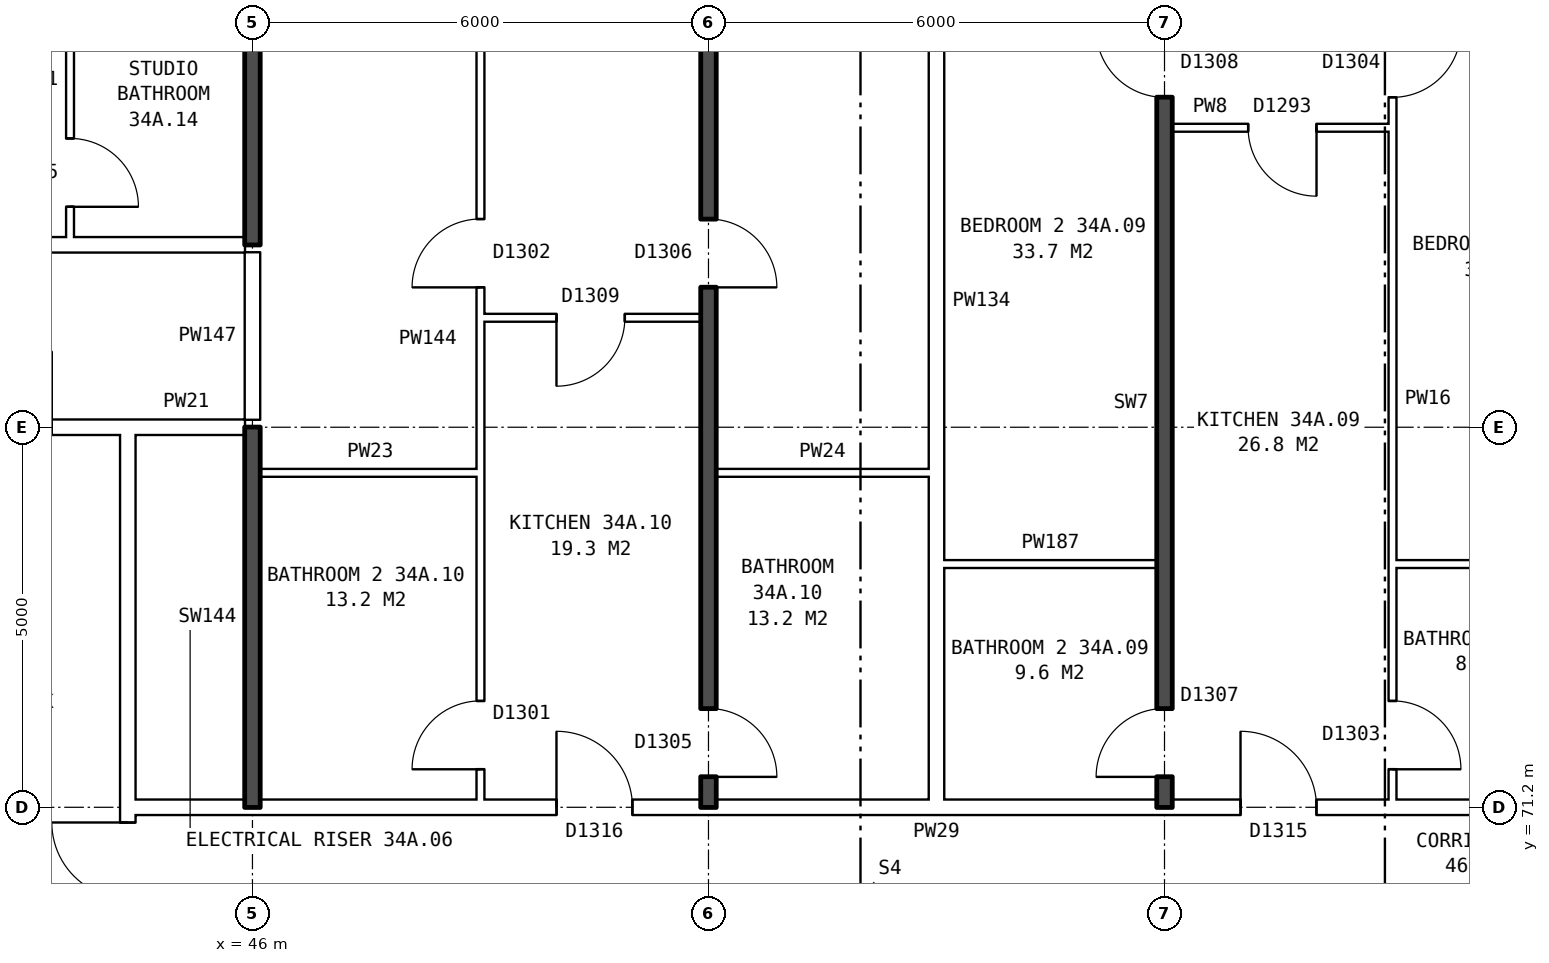
"""IFC4 building model, lengths in metres.
Left out: names, types, materials, properties, quantities, classifications, styles, units other than length and angle.
Written with IfcOpenShell. Run it as: python <this file> out.ifc"""

import sys

from ifc_helpers import new_model, si_unit, direction, frame, frame_2d, origin, place, context, subcontext, project, spatial, rectangle, extrude, element, fill, save


model = new_model("IFC4")
c1 = context("Model", 3, precision=1e-05, world=origin(), true_north=direction((0.0, 1.0)))
c2 = subcontext(c1, "Body", "Model", "MODEL_VIEW")
j1 = project(units=[si_unit("LENGTHUNIT", "METRE"), si_unit("PLANEANGLEUNIT", "RADIAN")], contexts=[c1])
p1 = place(None, origin())
s1 = spatial("IfcSite", under=j1, at=p1, CompositionType="ELEMENT")
p2 = place(p1, origin())
s2 = spatial("IfcBuilding", under=s1, at=p2, CompositionType="ELEMENT")
p3 = place(p2, frame((0.0, 0.0, 123.7)))
s3 = spatial("IfcBuildingStorey", under=s2, at=p3, CompositionType="ELEMENT", Elevation=123.7)
p4 = place(p3, frame((44.36, 63.9, 0.0), z_axis=(0.0, 0.0, 1.0), x_axis=(0.0, 1.0, 0.0)))
e1 = element("IfcWall", 1, at=p4, inside=s3, PredefinedType="PARTITIONING", context=c2, shape_type="SweptSolid", body=[
    extrude(rectangle(XDim=12.2, YDim=0.2, at=frame_2d((6.1, 0.0))), origin(), (0.0, 0.0, 1.0), 2.85),
])
p5 = place(p4, frame((5.1, 0.0, 0.0)))
e2 = element("IfcOpeningElement", 2, at=p5, cuts=e1, PredefinedType="OPENING", context=c2, shape_type="SweptSolid", body=[
    extrude(rectangle(XDim=2.0, YDim=2.1, at=frame_2d((1.0, 1.05))), frame((0.0, 0.11, 0.0), z_axis=(0.0, -1.0, 0.0), x_axis=(1.0, 0.0, 0.0)), (0.0, 0.0, 1.0), 0.22),
])
p6 = place(p3, frame((44.36, 71.2, 0.0), z_axis=(0.0, 0.0, 1.0), x_axis=(1.0, 0.0, 0.0)))
e3 = element("IfcWall", 3, at=p6, inside=s3, PredefinedType="PARTITIONING", context=c2, shape_type="SweptSolid", body=[
    extrude(rectangle(XDim=19.28, YDim=0.2, at=frame_2d((9.64, 0.0))), origin(), (0.0, 0.0, 1.0), 2.85),
])
p7 = place(p6, frame((14.64, 0.0, 0.0)))
e4 = element("IfcOpeningElement", 4, at=p7, cuts=e3, PredefinedType="OPENING", context=c2, shape_type="SweptSolid", body=[
    extrude(rectangle(XDim=1.0, YDim=2.1, at=frame_2d((0.5, 1.05))), frame((0.0, 0.11, 0.0), z_axis=(0.0, -1.0, 0.0), x_axis=(1.0, 0.0, 0.0)), (0.0, 0.0, 1.0), 0.22),
])
p8 = place(p6, frame((5.64, 0.0, 0.0)))
e5 = element("IfcOpeningElement", 5, at=p8, cuts=e3, PredefinedType="OPENING", context=c2, shape_type="SweptSolid", body=[
    extrude(rectangle(XDim=1.0, YDim=2.1, at=frame_2d((0.5, 1.05))), frame((0.0, 0.11, 0.0), z_axis=(0.0, -1.0, 0.0), x_axis=(1.0, 0.0, 0.0)), (0.0, 0.0, 1.0), 0.22),
])
p9 = place(p3, frame((55.1, 74.4, 0.0), z_axis=(0.0, 0.0, 1.0), x_axis=(1.0, 0.0, 0.0)))
e6 = element("IfcWall", 6, at=p9, inside=s3, PredefinedType="PARTITIONING", context=c2, shape_type="SweptSolid", body=[
    extrude(rectangle(XDim=2.8, YDim=0.1, at=frame_2d((1.4, 0.0))), origin(), (0.0, 0.0, 1.0), 2.85),
])
p10 = place(p3, frame((61.0, 74.4, 0.0), z_axis=(0.0, 0.0, 1.0), x_axis=(1.0, 0.0, 0.0)))
e7 = element("IfcWall", 7, at=p10, inside=s3, PredefinedType="PARTITIONING", context=c2, shape_type="SweptSolid", body=[
    extrude(rectangle(XDim=2.64, YDim=0.1, at=frame_2d((1.32, 0.0))), origin(), (0.0, 0.0, 1.0), 2.85),
])
p11 = place(p3, frame((46.1, 75.6, 0.0), z_axis=(0.0, 0.0, 1.0), x_axis=(1.0, 0.0, 0.0)))
e8 = element("IfcWall", 8, at=p11, inside=s3, PredefinedType="PARTITIONING", context=c2, shape_type="SweptSolid", body=[
    extrude(rectangle(XDim=2.9, YDim=0.1, at=frame_2d((1.45, 0.0))), origin(), (0.0, 0.0, 1.0), 2.85),
])
p12 = place(p3, frame((52.1, 75.6, 0.0), z_axis=(0.0, 0.0, 1.0), x_axis=(1.0, 0.0, 0.0)))
e9 = element("IfcWall", 9, at=p12, inside=s3, PredefinedType="PARTITIONING", context=c2, shape_type="SweptSolid", body=[
    extrude(rectangle(XDim=2.8, YDim=0.1, at=frame_2d((1.4, 0.0))), origin(), (0.0, 0.0, 1.0), 2.85),
])
p13 = place(p3, frame((41.36, 76.2, 0.0), z_axis=(0.0, 0.0, 1.0), x_axis=(1.0, 0.0, 0.0)))
e10 = element("IfcWall", 10, at=p13, inside=s3, PredefinedType="PARTITIONING", context=c2, shape_type="SweptSolid", body=[
    extrude(rectangle(XDim=3.0, YDim=0.2, at=frame_2d((1.5, 0.0))), origin(), (0.0, 0.0, 1.0), 2.85),
])
p14 = place(p13, frame((1.0, 0.0, 0.0)))
e11 = element("IfcOpeningElement", 11, at=p14, cuts=e10, PredefinedType="OPENING", context=c2, shape_type="SweptSolid", body=[
    extrude(rectangle(XDim=1.0, YDim=2.1, at=frame_2d((0.5, 1.05))), frame((0.0, 0.11, 0.0), z_axis=(0.0, -1.0, 0.0), x_axis=(1.0, 0.0, 0.0)), (0.0, 0.0, 1.0), 0.22),
])
p15 = place(p3, frame((44.36, 76.2, 0.0), z_axis=(0.0, 0.0, 1.0), x_axis=(1.0, 0.0, 0.0)))
e12 = element("IfcWall", 12, at=p15, inside=s3, PredefinedType="PARTITIONING", context=c2, shape_type="SweptSolid", body=[
    extrude(rectangle(XDim=1.54, YDim=0.2, at=frame_2d((0.77, 0.0))), origin(), (0.0, 0.0, 1.0), 2.85),
])
p16 = place(p3, frame((49.0, 77.64, 0.0), z_axis=(0.0, 0.0, 1.0), x_axis=(1.0, 0.0, 0.0)))
e13 = element("IfcWall", 13, at=p16, inside=s3, PredefinedType="PARTITIONING", context=c2, shape_type="SweptSolid", body=[
    extrude(rectangle(XDim=2.9, YDim=0.1, at=frame_2d((1.45, 0.0))), origin(), (0.0, 0.0, 1.0), 2.85),
])
p17 = place(p16, frame((1.0, 0.0, 0.0)))
e14 = element("IfcOpeningElement", 14, at=p17, cuts=e13, PredefinedType="OPENING", context=c2, shape_type="SweptSolid", body=[
    extrude(rectangle(XDim=0.9, YDim=2.1, at=frame_2d((0.45, 1.05))), frame((0.0, 0.06, 0.0), z_axis=(0.0, -1.0, 0.0), x_axis=(1.0, 0.0, 0.0)), (0.0, 0.0, 1.0), 0.12),
])
p18 = place(p3, frame((27.11, 78.6, 0.0), z_axis=(0.0, 0.0, 1.0), x_axis=(1.0, 0.0, 0.0)))
e15 = element("IfcWall", 15, at=p18, inside=s3, PredefinedType="PARTITIONING", context=c2, shape_type="SweptSolid", body=[
    extrude(rectangle(XDim=18.79, YDim=0.2, at=frame_2d((9.395, 0.0))), origin(), (0.0, 0.0, 1.0), 2.85),
])
p19 = place(p18, frame((14.19, 0.0, 0.0)))
e16 = element("IfcOpeningElement", 16, at=p19, cuts=e15, PredefinedType="OPENING", context=c2, shape_type="SweptSolid", body=[
    extrude(rectangle(XDim=1.0, YDim=2.1, at=frame_2d((0.5, 1.05))), frame((0.0, 0.11, 0.0), z_axis=(0.0, -1.0, 0.0), x_axis=(1.0, 0.0, 0.0)), (0.0, 0.0, 1.0), 0.22),
])
p20 = place(p18, frame((10.39, 0.0, 0.0)))
e17 = element("IfcOpeningElement", 17, at=p20, cuts=e15, PredefinedType="OPENING", context=c2, shape_type="SweptSolid", body=[
    extrude(rectangle(XDim=1.0, YDim=2.1, at=frame_2d((0.5, 1.05))), frame((0.0, 0.11, 0.0), z_axis=(0.0, -1.0, 0.0), x_axis=(1.0, 0.0, 0.0)), (0.0, 0.0, 1.0), 0.22),
])
p21 = place(p18, frame((4.59, 0.0, 0.0)))
e18 = element("IfcOpeningElement", 18, at=p21, cuts=e15, PredefinedType="OPENING", context=c2, shape_type="SweptSolid", body=[
    extrude(rectangle(XDim=1.0, YDim=2.1, at=frame_2d((0.5, 1.05))), frame((0.0, 0.11, 0.0), z_axis=(0.0, -1.0, 0.0), x_axis=(1.0, 0.0, 0.0)), (0.0, 0.0, 1.0), 0.22),
])
p22 = place(p3, frame((58.1, 80.14, 0.0), z_axis=(0.0, 0.0, 1.0), x_axis=(1.0, 0.0, 0.0)))
e19 = element("IfcWall", 19, at=p22, inside=s3, PredefinedType="PARTITIONING", context=c2, shape_type="SweptSolid", body=[
    extrude(rectangle(XDim=2.9, YDim=0.1, at=frame_2d((1.45, 0.0))), origin(), (0.0, 0.0, 1.0), 2.85),
])
p23 = place(p22, frame((1.0, 0.0, 0.0)))
e20 = element("IfcOpeningElement", 20, at=p23, cuts=e19, PredefinedType="OPENING", context=c2, shape_type="SweptSolid", body=[
    extrude(rectangle(XDim=0.9, YDim=2.1, at=frame_2d((0.45, 1.05))), frame((0.0, 0.06, 0.0), z_axis=(0.0, -1.0, 0.0), x_axis=(1.0, 0.0, 0.0)), (0.0, 0.0, 1.0), 0.12),
])
p24 = place(p3, frame((43.6, 78.7, 0.0), z_axis=(0.0, 0.0, 1.0), x_axis=(0.0, 1.0, 0.0)))
e21 = element("IfcWall", 21, at=p24, inside=s3, PredefinedType="PARTITIONING", context=c2, shape_type="SweptSolid", body=[
    extrude(rectangle(XDim=2.85, YDim=0.1, at=frame_2d((1.425, 0.0))), origin(), (0.0, 0.0, 1.0), 2.85),
])
p25 = place(p24, frame((0.4, 0.0, 0.0)))
e22 = element("IfcOpeningElement", 22, at=p25, cuts=e21, PredefinedType="OPENING", context=c2, shape_type="SweptSolid", body=[
    extrude(rectangle(XDim=0.9, YDim=2.1, at=frame_2d((0.45, 1.05))), frame((0.0, 0.06, 0.0), z_axis=(0.0, -1.0, 0.0), x_axis=(1.0, 0.0, 0.0)), (0.0, 0.0, 1.0), 0.12),
])
p26 = place(p3, frame((46.0, 71.2, 0.0), z_axis=(0.0, 0.0, 1.0), x_axis=(0.0, 1.0, 0.0)))
e23 = element("IfcWall", 23, at=p26, inside=s3, PredefinedType="SOLIDWALL", context=c2, shape_type="SweptSolid", body=[
    extrude(rectangle(XDim=5.0, YDim=0.2, at=frame_2d((2.5, 0.0))), origin(), (0.0, 0.0, 1.0), 2.85),
])
p27 = place(p3, frame((46.0, 76.3, 0.0), z_axis=(0.0, 0.0, 1.0), x_axis=(0.0, 1.0, 0.0)))
e24 = element("IfcWall", 24, at=p27, inside=s3, PredefinedType="PARTITIONING", context=c2, shape_type="SweptSolid", body=[
    extrude(rectangle(XDim=2.2, YDim=0.2, at=frame_2d((1.1, 0.0))), origin(), (0.0, 0.0, 1.0), 2.85),
])
p28 = place(p3, frame((46.0, 78.6, 0.0), z_axis=(0.0, 0.0, 1.0), x_axis=(0.0, 1.0, 0.0)))
e25 = element("IfcWall", 25, at=p28, inside=s3, PredefinedType="SOLIDWALL", context=c2, shape_type="SweptSolid", body=[
    extrude(rectangle(XDim=7.04, YDim=0.2, at=frame_2d((3.52, 0.0))), origin(), (0.0, 0.0, 1.0), 2.85),
])
p29 = place(p3, frame((49.0, 71.3, 0.0), z_axis=(0.0, 0.0, 1.0), x_axis=(0.0, 1.0, 0.0)))
e26 = element("IfcWall", 26, at=p29, inside=s3, PredefinedType="PARTITIONING", context=c2, shape_type="SweptSolid", body=[
    extrude(rectangle(XDim=14.34, YDim=0.1, at=frame_2d((7.17, 0.0))), origin(), (0.0, 0.0, 1.0), 2.85),
])
p30 = place(p29, frame((6.74, 0.0, 0.0)))
e27 = element("IfcOpeningElement", 27, at=p30, cuts=e26, PredefinedType="OPENING", context=c2, shape_type="SweptSolid", body=[
    extrude(rectangle(XDim=0.9, YDim=2.1, at=frame_2d((0.45, 1.05))), frame((0.0, 0.06, 0.0), z_axis=(0.0, -1.0, 0.0), x_axis=(1.0, 0.0, 0.0)), (0.0, 0.0, 1.0), 0.12),
])
p31 = place(p29, frame((0.4, 0.0, 0.0)))
e28 = element("IfcOpeningElement", 28, at=p31, cuts=e26, PredefinedType="OPENING", context=c2, shape_type="SweptSolid", body=[
    extrude(rectangle(XDim=0.9, YDim=2.1, at=frame_2d((0.45, 1.05))), frame((0.0, 0.06, 0.0), z_axis=(0.0, -1.0, 0.0), x_axis=(1.0, 0.0, 0.0)), (0.0, 0.0, 1.0), 0.12),
])
p32 = place(p3, frame((52.0, 71.2, 0.0), z_axis=(0.0, 0.0, 1.0), x_axis=(0.0, 1.0, 0.0)))
e29 = element("IfcWall", 29, at=p32, inside=s3, PredefinedType="SOLIDWALL", context=c2, shape_type="SweptSolid", body=[
    extrude(rectangle(XDim=14.44, YDim=0.2, at=frame_2d((7.22, 0.0))), origin(), (0.0, 0.0, 1.0), 2.85),
])
p33 = place(p32, frame((6.84, 0.0, 0.0)))
e30 = element("IfcOpeningElement", 30, at=p33, cuts=e29, PredefinedType="OPENING", context=c2, shape_type="SweptSolid", body=[
    extrude(rectangle(XDim=0.9, YDim=2.1, at=frame_2d((0.45, 1.05))), frame((0.0, 0.11, 0.0), z_axis=(0.0, -1.0, 0.0), x_axis=(1.0, 0.0, 0.0)), (0.0, 0.0, 1.0), 0.22),
])
p34 = place(p32, frame((0.4, 0.0, 0.0)))
e31 = element("IfcOpeningElement", 31, at=p34, cuts=e29, PredefinedType="OPENING", context=c2, shape_type="SweptSolid", body=[
    extrude(rectangle(XDim=0.9, YDim=2.1, at=frame_2d((0.45, 1.05))), frame((0.0, 0.11, 0.0), z_axis=(0.0, -1.0, 0.0), x_axis=(1.0, 0.0, 0.0)), (0.0, 0.0, 1.0), 0.22),
])
p35 = place(p3, frame((55.0, 71.3, 0.0), z_axis=(0.0, 0.0, 1.0), x_axis=(0.0, 1.0, 0.0)))
e32 = element("IfcWall", 32, at=p35, inside=s3, PredefinedType="PARTITIONING", context=c2, shape_type="SweptSolid", body=[
    extrude(rectangle(XDim=14.34, YDim=0.2, at=frame_2d((7.17, 0.0))), origin(), (0.0, 0.0, 1.0), 2.85),
])
p36 = place(p3, frame((58.0, 71.2, 0.0), z_axis=(0.0, 0.0, 1.0), x_axis=(0.0, 1.0, 0.0)))
e33 = element("IfcWall", 33, at=p36, inside=s3, PredefinedType="SOLIDWALL", context=c2, shape_type="SweptSolid", body=[
    extrude(rectangle(XDim=14.44, YDim=0.2, at=frame_2d((7.22, 0.0))), origin(), (0.0, 0.0, 1.0), 2.85),
])
p37 = place(p36, frame((9.34, 0.0, 0.0)))
e34 = element("IfcOpeningElement", 34, at=p37, cuts=e33, PredefinedType="OPENING", context=c2, shape_type="SweptSolid", body=[
    extrude(rectangle(XDim=0.9, YDim=2.1, at=frame_2d((0.45, 1.05))), frame((0.0, 0.11, 0.0), z_axis=(0.0, -1.0, 0.0), x_axis=(1.0, 0.0, 0.0)), (0.0, 0.0, 1.0), 0.22),
])
p38 = place(p36, frame((0.4, 0.0, 0.0)))
e35 = element("IfcOpeningElement", 35, at=p38, cuts=e33, PredefinedType="OPENING", context=c2, shape_type="SweptSolid", body=[
    extrude(rectangle(XDim=0.9, YDim=2.1, at=frame_2d((0.45, 1.05))), frame((0.0, 0.11, 0.0), z_axis=(0.0, -1.0, 0.0), x_axis=(1.0, 0.0, 0.0)), (0.0, 0.0, 1.0), 0.22),
])
p39 = place(p3, frame((61.0, 71.3, 0.0), z_axis=(0.0, 0.0, 1.0), x_axis=(0.0, 1.0, 0.0)))
e36 = element("IfcWall", 36, at=p39, inside=s3, PredefinedType="PARTITIONING", context=c2, shape_type="SweptSolid", body=[
    extrude(rectangle(XDim=14.34, YDim=0.1, at=frame_2d((7.17, 0.0))), origin(), (0.0, 0.0, 1.0), 2.85),
])
p40 = place(p39, frame((9.24, 0.0, 0.0)))
e37 = element("IfcOpeningElement", 37, at=p40, cuts=e36, PredefinedType="OPENING", context=c2, shape_type="SweptSolid", body=[
    extrude(rectangle(XDim=0.9, YDim=2.1, at=frame_2d((0.45, 1.05))), frame((0.0, 0.06, 0.0), z_axis=(0.0, -1.0, 0.0), x_axis=(1.0, 0.0, 0.0)), (0.0, 0.0, 1.0), 0.12),
])
p41 = place(p39, frame((0.4, 0.0, 0.0)))
e38 = element("IfcOpeningElement", 38, at=p41, cuts=e36, PredefinedType="OPENING", context=c2, shape_type="SweptSolid", body=[
    extrude(rectangle(XDim=0.9, YDim=2.1, at=frame_2d((0.45, 1.05))), frame((0.0, 0.06, 0.0), z_axis=(0.0, -1.0, 0.0), x_axis=(1.0, 0.0, 0.0)), (0.0, 0.0, 1.0), 0.12),
])
p42 = place(p5, origin())
e39 = element("IfcDoor", 39, at=p42, inside=s3, OperationType="DOUBLE_DOOR_SINGLE_SWING", PredefinedType="DOOR", context=c2, shape_type="SweptSolid", body=[
    extrude(rectangle(XDim=2.0, YDim=2.1, at=frame_2d((1.0, 1.05))), frame((0.0, 0.025, 0.0), z_axis=(0.0, -1.0, 0.0), x_axis=(1.0, 0.0, 0.0)), (0.0, 0.0, 1.0), 0.05),
])
fill(e2, e39)
p43 = place(p40, frame((0.9, 0.0, 0.0), z_axis=(0.0, 0.0, 1.0), x_axis=(-1.0, 0.0, 0.0)))
e40 = element("IfcDoor", 40, at=p43, inside=s3, OperationType="SINGLE_SWING_LEFT", PredefinedType="DOOR", context=c2, shape_type="SweptSolid", body=[
    extrude(rectangle(XDim=0.9, YDim=2.1, at=frame_2d((0.45, 1.05))), frame((0.0, 0.025, 0.0), z_axis=(0.0, -1.0, 0.0), x_axis=(1.0, 0.0, 0.0)), (0.0, 0.0, 1.0), 0.05),
])
fill(e37, e40)
p44 = place(p37, origin())
e41 = element("IfcDoor", 41, at=p44, inside=s3, OperationType="SINGLE_SWING_RIGHT", PredefinedType="DOOR", context=c2, shape_type="SweptSolid", body=[
    extrude(rectangle(XDim=0.9, YDim=2.1, at=frame_2d((0.45, 1.05))), frame((0.0, 0.025, 0.0), z_axis=(0.0, -1.0, 0.0), x_axis=(1.0, 0.0, 0.0)), (0.0, 0.0, 1.0), 0.05),
])
fill(e34, e41)
p45 = place(p7, origin())
e42 = element("IfcDoor", 42, at=p45, inside=s3, OperationType="SINGLE_SWING_LEFT", PredefinedType="DOOR", context=c2, shape_type="SweptSolid", body=[
    extrude(rectangle(XDim=1.0, YDim=2.1, at=frame_2d((0.5, 1.05))), frame((0.0, 0.025, 0.0), z_axis=(0.0, -1.0, 0.0), x_axis=(1.0, 0.0, 0.0)), (0.0, 0.0, 1.0), 0.05),
])
fill(e4, e42)
p46 = place(p23, frame((0.9, 0.0, 0.0), z_axis=(0.0, 0.0, 1.0), x_axis=(-1.0, 0.0, 0.0)))
e43 = element("IfcDoor", 43, at=p46, inside=s3, OperationType="SINGLE_SWING_LEFT", PredefinedType="DOOR", context=c2, shape_type="SweptSolid", body=[
    extrude(rectangle(XDim=0.9, YDim=2.1, at=frame_2d((0.45, 1.05))), frame((0.0, 0.025, 0.0), z_axis=(0.0, -1.0, 0.0), x_axis=(1.0, 0.0, 0.0)), (0.0, 0.0, 1.0), 0.05),
])
fill(e20, e43)
p47 = place(p41, frame((0.9, 0.0, 0.0), z_axis=(0.0, 0.0, 1.0), x_axis=(-1.0, 0.0, 0.0)))
e44 = element("IfcDoor", 44, at=p47, inside=s3, OperationType="SINGLE_SWING_RIGHT", PredefinedType="DOOR", context=c2, shape_type="SweptSolid", body=[
    extrude(rectangle(XDim=0.9, YDim=2.1, at=frame_2d((0.45, 1.05))), frame((0.0, 0.025, 0.0), z_axis=(0.0, -1.0, 0.0), x_axis=(1.0, 0.0, 0.0)), (0.0, 0.0, 1.0), 0.05),
])
fill(e38, e44)
p48 = place(p38, origin())
e45 = element("IfcDoor", 45, at=p48, inside=s3, OperationType="SINGLE_SWING_LEFT", PredefinedType="DOOR", context=c2, shape_type="SweptSolid", body=[
    extrude(rectangle(XDim=0.9, YDim=2.1, at=frame_2d((0.45, 1.05))), frame((0.0, 0.025, 0.0), z_axis=(0.0, -1.0, 0.0), x_axis=(1.0, 0.0, 0.0)), (0.0, 0.0, 1.0), 0.05),
])
fill(e35, e45)
p49 = place(p33, frame((0.9, 0.0, 0.0), z_axis=(0.0, 0.0, 1.0), x_axis=(-1.0, 0.0, 0.0)))
e46 = element("IfcDoor", 46, at=p49, inside=s3, OperationType="SINGLE_SWING_RIGHT", PredefinedType="DOOR", context=c2, shape_type="SweptSolid", body=[
    extrude(rectangle(XDim=0.9, YDim=2.1, at=frame_2d((0.45, 1.05))), frame((0.0, 0.025, 0.0), z_axis=(0.0, -1.0, 0.0), x_axis=(1.0, 0.0, 0.0)), (0.0, 0.0, 1.0), 0.05),
])
fill(e30, e46)
p50 = place(p30, origin())
e47 = element("IfcDoor", 47, at=p50, inside=s3, OperationType="SINGLE_SWING_LEFT", PredefinedType="DOOR", context=c2, shape_type="SweptSolid", body=[
    extrude(rectangle(XDim=0.9, YDim=2.1, at=frame_2d((0.45, 1.05))), frame((0.0, 0.025, 0.0), z_axis=(0.0, -1.0, 0.0), x_axis=(1.0, 0.0, 0.0)), (0.0, 0.0, 1.0), 0.05),
])
fill(e27, e47)
p51 = place(p8, origin())
e48 = element("IfcDoor", 48, at=p51, inside=s3, OperationType="SINGLE_SWING_LEFT", PredefinedType="DOOR", context=c2, shape_type="SweptSolid", body=[
    extrude(rectangle(XDim=1.0, YDim=2.1, at=frame_2d((0.5, 1.05))), frame((0.0, 0.025, 0.0), z_axis=(0.0, -1.0, 0.0), x_axis=(1.0, 0.0, 0.0)), (0.0, 0.0, 1.0), 0.05),
])
fill(e5, e48)
p52 = place(p17, frame((0.9, 0.0, 0.0), z_axis=(0.0, 0.0, 1.0), x_axis=(-1.0, 0.0, 0.0)))
e49 = element("IfcDoor", 49, at=p52, inside=s3, OperationType="SINGLE_SWING_RIGHT", PredefinedType="DOOR", context=c2, shape_type="SweptSolid", body=[
    extrude(rectangle(XDim=0.9, YDim=2.1, at=frame_2d((0.45, 1.05))), frame((0.0, 0.025, 0.0), z_axis=(0.0, -1.0, 0.0), x_axis=(1.0, 0.0, 0.0)), (0.0, 0.0, 1.0), 0.05),
])
fill(e14, e49)
p53 = place(p34, frame((0.9, 0.0, 0.0), z_axis=(0.0, 0.0, 1.0), x_axis=(-1.0, 0.0, 0.0)))
e50 = element("IfcDoor", 50, at=p53, inside=s3, OperationType="SINGLE_SWING_RIGHT", PredefinedType="DOOR", context=c2, shape_type="SweptSolid", body=[
    extrude(rectangle(XDim=0.9, YDim=2.1, at=frame_2d((0.45, 1.05))), frame((0.0, 0.025, 0.0), z_axis=(0.0, -1.0, 0.0), x_axis=(1.0, 0.0, 0.0)), (0.0, 0.0, 1.0), 0.05),
])
fill(e31, e50)
p54 = place(p31, origin())
e51 = element("IfcDoor", 51, at=p54, inside=s3, OperationType="SINGLE_SWING_LEFT", PredefinedType="DOOR", context=c2, shape_type="SweptSolid", body=[
    extrude(rectangle(XDim=0.9, YDim=2.1, at=frame_2d((0.45, 1.05))), frame((0.0, 0.025, 0.0), z_axis=(0.0, -1.0, 0.0), x_axis=(1.0, 0.0, 0.0)), (0.0, 0.0, 1.0), 0.05),
])
fill(e28, e51)
p55 = place(p25, frame((0.9, 0.0, 0.0), z_axis=(0.0, 0.0, 1.0), x_axis=(-1.0, 0.0, 0.0)))
e52 = element("IfcDoor", 52, at=p55, inside=s3, OperationType="SINGLE_SWING_RIGHT", PredefinedType="DOOR", context=c2, shape_type="SweptSolid", body=[
    extrude(rectangle(XDim=0.9, YDim=2.1, at=frame_2d((0.45, 1.05))), frame((0.0, 0.025, 0.0), z_axis=(0.0, -1.0, 0.0), x_axis=(1.0, 0.0, 0.0)), (0.0, 0.0, 1.0), 0.05),
])
fill(e22, e52)
save(model, sys.argv[1])
